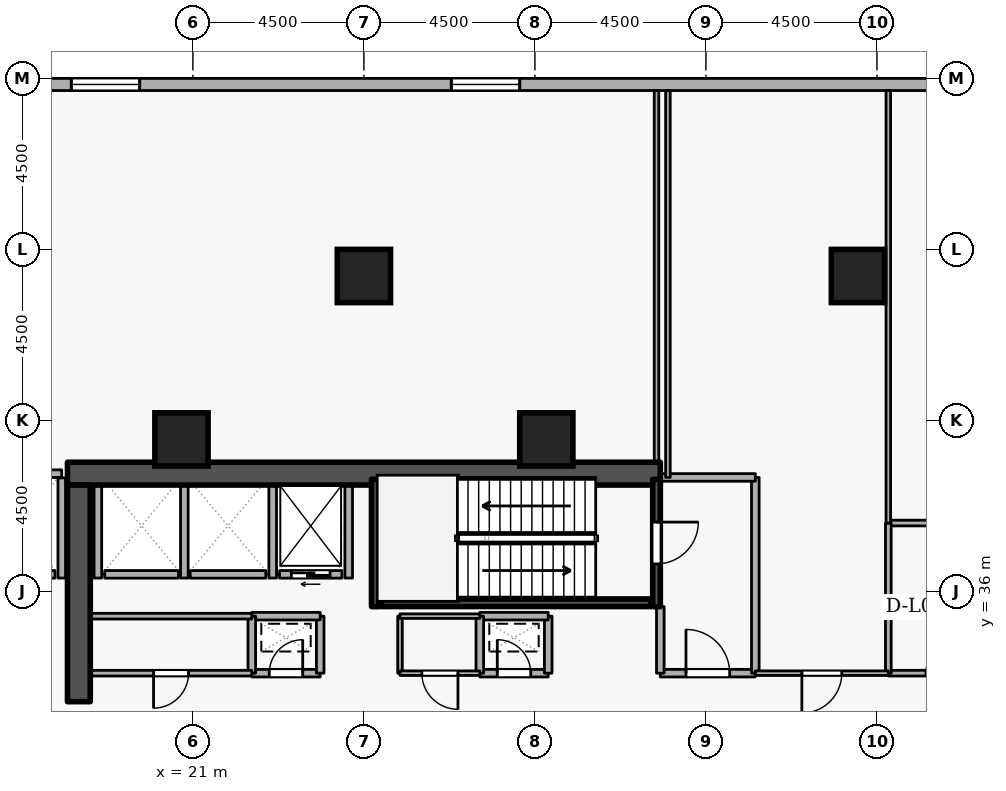
"""IFC4 building model, lengths in metres.
Left out: names, types, materials, properties, quantities, classifications, styles, units other than length and angle.
Written with IfcOpenShell. Run it as: python <this file> out.ifc"""

import sys

from ifc_helpers import new_model, si_unit, direction, frame, frame_2d, origin, origin_2d, place, context, subcontext, project, spatial, rectangle, extrude, element, fill, save


model = new_model("IFC4")
c1 = context("Model", 3, precision=1e-05, world=origin(), true_north=direction((0.0, 1.0)))
c2 = subcontext(c1, "Body", "Model", "MODEL_VIEW")
j1 = project(units=[si_unit("LENGTHUNIT", "METRE"), si_unit("PLANEANGLEUNIT", "RADIAN")], contexts=[c1])
p1 = place(None, origin())
s1 = spatial("IfcSite", under=j1, at=p1, CompositionType="ELEMENT")
p2 = place(p1, origin())
s2 = spatial("IfcBuilding", under=s1, at=p2, CompositionType="ELEMENT")
p3 = place(p2, frame((0.0, 0.0, 14.1)))
s3 = spatial("IfcBuildingStorey", under=s2, at=p3, CompositionType="ELEMENT", Elevation=14.1)
p4 = place(p3, frame((17.7, 39.1, 0.0), z_axis=(0.0, 0.0, 1.0), x_axis=(1.0, 0.0, 0.0)))
e1 = element("IfcWall", 1, at=p4, inside=s3, PredefinedType="SHEAR", context=c2, shape_type="SweptSolid", body=[
    extrude(rectangle(XDim=15.6, YDim=0.6, at=frame_2d((7.8, 0.0))), origin(), (0.0, 0.0, 1.0), 4.5),
])
p5 = place(p3, frame((18.0, 33.1, 0.0), z_axis=(0.0, 0.0, 1.0), x_axis=(0.0, 1.0, 0.0)))
e2 = element("IfcWall", 2, at=p5, inside=s3, PredefinedType="SHEAR", context=c2, shape_type="SweptSolid", body=[
    extrude(rectangle(XDim=5.7, YDim=0.6, at=frame_2d((2.85, 0.0))), origin(), (0.0, 0.0, 1.0), 4.5),
])
for number, where, z_axis, x_axis in (
    (3, (25.5, 44.3, 0.0), (0.0, 0.0, 1.0), (1.0, 0.0, 0.0)),
    (4, (38.5, 44.3, 0.0), (0.0, 0.0, 1.0), (1.0, 0.0, 0.0)),
    (5, (20.7, 40.0, 0.0), (0.0, 0.0, 1.0), (1.0, 0.0, 0.0)),
    (6, (30.3, 40.0, 0.0), (0.0, 0.0, 1.0), (1.0, 0.0, 0.0)),
):
    element("IfcColumn", number, at=place(p3, frame(where, z_axis=z_axis, x_axis=x_axis)), inside=s3, PredefinedType="COLUMN", context=c2, shape_type="SweptSolid", body=[
        extrude(rectangle(XDim=1.4, YDim=1.4, at=origin_2d()), origin(), (0.0, 0.0, 1.0), 4.5),
    ])
p6 = place(p3, frame((42.4, 49.34, 0.0), z_axis=(0.0, 0.0, 1.0), x_axis=(-1.0, 0.0, 0.0)))
e7 = element("IfcWall", 7, at=p6, inside=s3, PredefinedType="STANDARD", context=c2, shape_type="SweptSolid", body=[
    extrude(rectangle(XDim=39.4, YDim=0.32, at=frame_2d((19.7, 0.0))), origin(), (0.0, 0.0, 1.0), 3.56),
])
p7 = place(p6, frame((12.8, 0.0, 0.78)))
e8 = element("IfcOpeningElement", 8, at=p7, cuts=e7, PredefinedType="OPENING", context=c2, shape_type="SweptSolid", body=[
    extrude(rectangle(XDim=1.8, YDim=2.15, at=frame_2d((0.9, 1.075))), frame((0.0, 0.17, 0.0), z_axis=(0.0, -1.0, 0.0), x_axis=(1.0, 0.0, 0.0)), (0.0, 0.0, 1.0), 0.34),
])
p8 = place(p6, frame((22.8, 0.0, 0.78)))
e9 = element("IfcOpeningElement", 9, at=p8, cuts=e7, PredefinedType="OPENING", context=c2, shape_type="SweptSolid", body=[
    extrude(rectangle(XDim=1.8, YDim=2.15, at=frame_2d((0.9, 1.075))), frame((0.0, 0.17, 0.0), z_axis=(0.0, -1.0, 0.0), x_axis=(1.0, 0.0, 0.0)), (0.0, 0.0, 1.0), 0.34),
])
p9 = place(p3, frame((24.92, 36.45, 0.0), z_axis=(0.0, 0.0, 1.0), x_axis=(-1.0, 0.0, 0.0)))
e10 = element("IfcWall", 10, at=p9, inside=s3, PredefinedType="STANDARD", context=c2, shape_type="SweptSolid", body=[
    extrude(rectangle(XDim=1.64, YDim=0.2, at=frame_2d((0.82, 0.0))), origin(), (0.0, 0.0, 1.0), 4.16),
])
p10 = place(p9, frame((0.31, 0.0, 0.0)))
e11 = element("IfcOpeningElement", 11, at=p10, cuts=e10, PredefinedType="OPENING", context=c2, shape_type="SweptSolid", body=[
    extrude(rectangle(XDim=1.02, YDim=2.06, at=frame_2d((0.51, 1.03))), frame((0.0, 0.11, 0.0), z_axis=(0.0, -1.0, 0.0), x_axis=(1.0, 0.0, 0.0)), (0.0, 0.0, 1.0), 0.22),
])
p11 = place(p3, frame((22.92, 36.45, 0.0), z_axis=(0.0, 0.0, 1.0), x_axis=(-1.0, 0.0, 0.0)))
e12 = element("IfcWall", 12, at=p11, inside=s3, PredefinedType="STANDARD", context=c2, shape_type="SweptSolid", body=[
    extrude(rectangle(XDim=1.99, YDim=0.2, at=frame_2d((0.995, 0.0))), origin(), (0.0, 0.0, 1.0), 4.16),
])
p12 = place(p3, frame((20.62, 36.45, 0.0), z_axis=(0.0, 0.0, 1.0), x_axis=(-1.0, 0.0, 0.0)))
e13 = element("IfcWall", 13, at=p12, inside=s3, PredefinedType="STANDARD", context=c2, shape_type="SweptSolid", body=[
    extrude(rectangle(XDim=1.94, YDim=0.2, at=frame_2d((0.97, 0.0))), origin(), (0.0, 0.0, 1.0), 4.16),
])
p13 = place(p3, frame((17.37, 36.45, 0.0), z_axis=(0.0, 0.0, 1.0), x_axis=(-1.0, 0.0, 0.0)))
e14 = element("IfcWall", 14, at=p13, inside=s3, PredefinedType="STANDARD", context=c2, shape_type="SweptSolid", body=[
    extrude(rectangle(XDim=1.74, YDim=0.2, at=frame_2d((0.87, 0.0))), origin(), (0.0, 0.0, 1.0), 4.16),
])
for number, where, z_axis, x_axis in (
    (15, (25.1, 36.352, 0.0), (0.0, 0.0, 1.0), (0.0, 1.0, 0.0)),
    (16, (23.1, 36.352, 0.0), (0.0, 0.0, 1.0), (0.0, 1.0, 0.0)),
    (17, (20.775, 36.352, 0.0), (0.0, 0.0, 1.0), (0.0, 1.0, 0.0)),
    (18, (18.5, 36.352, 0.0), (0.0, 0.0, 1.0), (0.0, 1.0, 0.0)),
):
    element("IfcWall", number, at=place(p3, frame(where, z_axis=z_axis, x_axis=x_axis)), inside=s3, PredefinedType="STANDARD", context=c2, shape_type="SweptSolid", body=[
        extrude(rectangle(XDim=2.436, YDim=0.2, at=frame_2d((1.218, 0.0))), origin(), (0.0, 0.0, 1.0), 4.16),
    ])
p14 = place(p3, frame((13.352, 39.1, 0.0), z_axis=(0.0, 0.0, 1.0), x_axis=(1.0, 0.0, 0.0)))
e19 = element("IfcWall", 19, at=p14, inside=s3, PredefinedType="STANDARD", context=c2, shape_type="SweptSolid", body=[
    extrude(rectangle(XDim=4.196, YDim=0.2, at=frame_2d((2.098, 0.0))), origin(), (0.0, 0.0, 1.0), 4.16),
])
p15 = place(p3, frame((17.55, 36.352, 0.0), z_axis=(0.0, 0.0, 1.0), x_axis=(0.0, 1.0, 0.0)))
e20 = element("IfcWall", 20, at=p15, inside=s3, PredefinedType="STANDARD", context=c2, shape_type="SweptSolid", body=[
    extrude(rectangle(XDim=2.636, YDim=0.2, at=frame_2d((1.318, 0.0))), origin(), (0.0, 0.0, 1.0), 3.365),
])
p16 = place(p3, frame((33.2, 38.95, 0.0), z_axis=(0.0, 0.0, 1.0), x_axis=(0.0, -1.0, 0.0)))
e21 = element("IfcWall", 21, at=p16, inside=s3, PredefinedType="SHEAR", context=c2, shape_type="SweptSolid", body=[
    extrude(rectangle(XDim=3.35, YDim=0.2, at=frame_2d((1.675, 0.0))), origin(), (0.0, 0.0, 1.0), 4.5),
])
p17 = place(p16, frame((1.125, 0.0, 0.0)))
e22 = element("IfcOpeningElement", 22, at=p17, cuts=e21, PredefinedType="OPENING", context=c2, shape_type="SweptSolid", body=[
    extrude(rectangle(XDim=1.1, YDim=2.1, at=frame_2d((0.55, 1.05))), frame((0.0, 0.11, 0.0), z_axis=(0.0, -1.0, 0.0), x_axis=(1.0, 0.0, 0.0)), (0.0, 0.0, 1.0), 0.22),
])
p18 = place(p3, frame((25.8, 35.6, 0.0), z_axis=(0.0, 0.0, 1.0), x_axis=(0.0, 1.0, 0.0)))
e23 = element("IfcWall", 23, at=p18, inside=s3, PredefinedType="SHEAR", context=c2, shape_type="SweptSolid", body=[
    extrude(rectangle(XDim=3.35, YDim=0.2, at=frame_2d((1.675, 0.0))), origin(), (0.0, 0.0, 1.0), 4.5),
])
p19 = place(p3, frame((25.95, 35.703, 0.0), z_axis=(0.0, 0.0, 1.0), x_axis=(1.0, 0.0, 0.0)))
e24 = element("IfcWall", 24, at=p19, inside=s3, PredefinedType="SHEAR", context=c2, shape_type="SweptSolid", body=[
    extrude(rectangle(XDim=7.1, YDim=0.2, at=frame_2d((3.55, 0.0))), origin(), (0.0, 0.0, 1.0), 4.5),
])
p20 = place(p3, frame((33.3, 33.85, 0.0), z_axis=(0.0, 0.0, 1.0), x_axis=(1.0, 0.0, 0.0)))
e25 = element("IfcWall", 25, at=p20, inside=s3, PredefinedType="STANDARD", context=c2, shape_type="SweptSolid", body=[
    extrude(rectangle(XDim=2.5, YDim=0.2, at=frame_2d((1.25, 0.0))), origin(), (0.0, 0.0, 1.0), 4.16),
])
p21 = place(p20, frame((0.675, 0.0, 0.0)))
e26 = element("IfcOpeningElement", 26, at=p21, cuts=e25, PredefinedType="OPENING", context=c2, shape_type="SweptSolid", body=[
    extrude(rectangle(XDim=1.15, YDim=2.1, at=frame_2d((0.575, 1.05))), frame((0.0, 0.11, 0.0), z_axis=(0.0, -1.0, 0.0), x_axis=(1.0, 0.0, 0.0)), (0.0, 0.0, 1.0), 0.22),
])
p22 = place(p3, frame((35.8, 33.85, 0.0), z_axis=(0.0, 0.0, 1.0), x_axis=(0.0, 1.0, 0.0)))
e27 = element("IfcWall", 27, at=p22, inside=s3, PredefinedType="STANDARD", context=c2, shape_type="SweptSolid", body=[
    extrude(rectangle(XDim=5.15, YDim=0.2, at=frame_2d((2.575, 0.0))), origin(), (0.0, 0.0, 1.0), 4.16),
])
p23 = place(p3, frame((35.8, 39.0, 0.0), z_axis=(0.0, 0.0, 1.0), x_axis=(-1.0, 0.0, 0.0)))
e28 = element("IfcWall", 28, at=p23, inside=s3, PredefinedType="STANDARD", context=c2, shape_type="SweptSolid", body=[
    extrude(rectangle(XDim=2.5, YDim=0.2, at=frame_2d((1.25, 0.0))), origin(), (0.0, 0.0, 1.0), 4.16),
])
p24 = place(p3, frame((33.3, 35.6, 0.0), z_axis=(0.0, 0.0, 1.0), x_axis=(0.0, -1.0, 0.0)))
e29 = element("IfcWall", 29, at=p24, inside=s3, PredefinedType="STANDARD", context=c2, shape_type="SweptSolid", body=[
    extrude(rectangle(XDim=1.75, YDim=0.2, at=frame_2d((0.875, 0.0))), origin(), (0.0, 0.0, 1.0), 3.365),
])
p25 = place(p3, frame((22.55, 33.85, 0.0), z_axis=(0.0, 0.0, 1.0), x_axis=(1.0, 0.0, 0.0)))
e30 = element("IfcWall", 30, at=p25, inside=s3, PredefinedType="STANDARD", context=c2, shape_type="SweptSolid", body=[
    extrude(rectangle(XDim=1.8, YDim=0.2, at=frame_2d((0.9, 0.0))), origin(), (0.0, 0.0, 1.0), 4.16),
])
p26 = place(p25, frame((0.46, 0.0, 0.0)))
e31 = element("IfcOpeningElement", 31, at=p26, cuts=e30, PredefinedType="OPENING", context=c2, shape_type="SweptSolid", body=[
    extrude(rectangle(XDim=0.88, YDim=2.04, at=frame_2d((0.44, 1.02))), frame((0.0, 0.11, 0.0), z_axis=(0.0, -1.0, 0.0), x_axis=(1.0, 0.0, 0.0)), (0.0, 0.0, 1.0), 0.22),
])
p27 = place(p3, frame((24.35, 33.85, 0.0), z_axis=(0.0, 0.0, 1.0), x_axis=(0.0, 1.0, 0.0)))
e32 = element("IfcWall", 32, at=p27, inside=s3, PredefinedType="STANDARD", context=c2, shape_type="SweptSolid", body=[
    extrude(rectangle(XDim=1.5, YDim=0.2, at=frame_2d((0.75, 0.0))), origin(), (0.0, 0.0, 1.0), 4.16),
])
p28 = place(p3, frame((24.35, 35.35, 0.0), z_axis=(0.0, 0.0, 1.0), x_axis=(-1.0, 0.0, 0.0)))
e33 = element("IfcWall", 33, at=p28, inside=s3, PredefinedType="STANDARD", context=c2, shape_type="SweptSolid", body=[
    extrude(rectangle(XDim=1.8, YDim=0.2, at=frame_2d((0.9, 0.0))), origin(), (0.0, 0.0, 1.0), 4.16),
])
p29 = place(p3, frame((22.55, 35.35, 0.0), z_axis=(0.0, 0.0, 1.0), x_axis=(0.0, -1.0, 0.0)))
e34 = element("IfcWall", 34, at=p29, inside=s3, PredefinedType="STANDARD", context=c2, shape_type="SweptSolid", body=[
    extrude(rectangle(XDim=1.5, YDim=0.2, at=frame_2d((0.75, 0.0))), origin(), (0.0, 0.0, 1.0), 4.16),
])
p30 = place(p3, frame((28.55, 33.85, 0.0), z_axis=(0.0, 0.0, 1.0), x_axis=(1.0, 0.0, 0.0)))
e35 = element("IfcWall", 35, at=p30, inside=s3, PredefinedType="STANDARD", context=c2, shape_type="SweptSolid", body=[
    extrude(rectangle(XDim=1.8, YDim=0.2, at=frame_2d((0.9, 0.0))), origin(), (0.0, 0.0, 1.0), 4.16),
])
p31 = place(p30, frame((0.46, 0.0, 0.0)))
e36 = element("IfcOpeningElement", 36, at=p31, cuts=e35, PredefinedType="OPENING", context=c2, shape_type="SweptSolid", body=[
    extrude(rectangle(XDim=0.88, YDim=2.04, at=frame_2d((0.44, 1.02))), frame((0.0, 0.11, 0.0), z_axis=(0.0, -1.0, 0.0), x_axis=(1.0, 0.0, 0.0)), (0.0, 0.0, 1.0), 0.22),
])
p32 = place(p3, frame((30.35, 33.85, 0.0), z_axis=(0.0, 0.0, 1.0), x_axis=(0.0, 1.0, 0.0)))
e37 = element("IfcWall", 37, at=p32, inside=s3, PredefinedType="STANDARD", context=c2, shape_type="SweptSolid", body=[
    extrude(rectangle(XDim=1.5, YDim=0.2, at=frame_2d((0.75, 0.0))), origin(), (0.0, 0.0, 1.0), 4.16),
])
p33 = place(p3, frame((30.35, 35.35, 0.0), z_axis=(0.0, 0.0, 1.0), x_axis=(-1.0, 0.0, 0.0)))
e38 = element("IfcWall", 38, at=p33, inside=s3, PredefinedType="STANDARD", context=c2, shape_type="SweptSolid", body=[
    extrude(rectangle(XDim=1.8, YDim=0.2, at=frame_2d((0.9, 0.0))), origin(), (0.0, 0.0, 1.0), 4.16),
])
p34 = place(p3, frame((28.55, 35.35, 0.0), z_axis=(0.0, 0.0, 1.0), x_axis=(0.0, -1.0, 0.0)))
e39 = element("IfcWall", 39, at=p34, inside=s3, PredefinedType="STANDARD", context=c2, shape_type="SweptSolid", body=[
    extrude(rectangle(XDim=1.5, YDim=0.2, at=frame_2d((0.75, 0.0))), origin(), (0.0, 0.0, 1.0), 4.16),
])
p35 = place(p3, frame((18.3, 35.35, 0.0), z_axis=(0.0, 0.0, 1.0), x_axis=(1.0, 0.0, 0.0)))
e40 = element("IfcWall", 40, at=p35, inside=s3, PredefinedType="PARTITIONING", context=c2, shape_type="SweptSolid", body=[
    extrude(rectangle(XDim=4.25, YDim=0.15, at=frame_2d((2.125, 0.0))), origin(), (0.0, 0.0, 1.0), 4.16),
])
p36 = place(p3, frame((22.55, 33.85, 0.0), z_axis=(0.0, 0.0, 1.0), x_axis=(-1.0, 0.0, 0.0)))
e41 = element("IfcWall", 41, at=p36, inside=s3, PredefinedType="PARTITIONING", context=c2, shape_type="SweptSolid", body=[
    extrude(rectangle(XDim=4.25, YDim=0.15, at=frame_2d((2.125, 0.0))), origin(), (0.0, 0.0, 1.0), 4.16),
])
p37 = place(p36, frame((1.665, 0.0, 0.0)))
e42 = element("IfcOpeningElement", 42, at=p37, cuts=e41, PredefinedType="OPENING", context=c2, shape_type="SweptSolid", body=[
    extrude(rectangle(XDim=0.92, YDim=2.08, at=frame_2d((0.46, 1.04))), frame((0.0, 0.085, 0.0), z_axis=(0.0, -1.0, 0.0), x_axis=(1.0, 0.0, 0.0)), (0.0, 0.0, 1.0), 0.17),
])
p38 = place(p3, frame((26.45, 33.85, 0.0), z_axis=(0.0, 0.0, 1.0), x_axis=(0.0, 1.0, 0.0)))
e43 = element("IfcWall", 43, at=p38, inside=s3, PredefinedType="PARTITIONING", context=c2, shape_type="SweptSolid", body=[
    extrude(rectangle(XDim=1.5, YDim=0.12, at=frame_2d((0.75, 0.0))), origin(), (0.0, 0.0, 1.0), 4.16),
])
p39 = place(p3, frame((26.45, 35.35, 0.0), z_axis=(0.0, 0.0, 1.0), x_axis=(1.0, 0.0, 0.0)))
e44 = element("IfcWall", 44, at=p39, inside=s3, PredefinedType="PARTITIONING", context=c2, shape_type="SweptSolid", body=[
    extrude(rectangle(XDim=2.1, YDim=0.12, at=frame_2d((1.05, 0.0))), origin(), (0.0, 0.0, 1.0), 4.16),
])
p40 = place(p3, frame((28.55, 33.85, 0.0), z_axis=(0.0, 0.0, 1.0), x_axis=(-1.0, 0.0, 0.0)))
e45 = element("IfcWall", 45, at=p40, inside=s3, PredefinedType="PARTITIONING", context=c2, shape_type="SweptSolid", body=[
    extrude(rectangle(XDim=2.1, YDim=0.12, at=frame_2d((1.05, 0.0))), origin(), (0.0, 0.0, 1.0), 4.16),
])
p41 = place(p40, frame((0.575, 0.0, 0.0)))
e46 = element("IfcOpeningElement", 46, at=p41, cuts=e45, PredefinedType="OPENING", context=c2, shape_type="SweptSolid", body=[
    extrude(rectangle(XDim=0.95, YDim=2.1, at=frame_2d((0.475, 1.05))), frame((0.0, 0.07, 0.0), z_axis=(0.0, -1.0, 0.0), x_axis=(1.0, 0.0, 0.0)), (0.0, 0.0, 1.0), 0.14),
])
p42 = place(p3, frame((39.3, 33.85, 0.0), z_axis=(0.0, 0.0, 1.0), x_axis=(1.0, 0.0, 0.0)))
e47 = element("IfcWall", 47, at=p42, inside=s3, PredefinedType="PARTITIONING", context=c2, shape_type="SweptSolid", body=[
    extrude(rectangle(XDim=2.9, YDim=0.15, at=frame_2d((1.45, 0.0))), origin(), (0.0, 0.0, 1.0), 4.16),
])
p43 = place(p42, frame((0.99, 0.0, 0.0)))
e48 = element("IfcOpeningElement", 48, at=p43, cuts=e47, PredefinedType="OPENING", context=c2, shape_type="SweptSolid", body=[
    extrude(rectangle(XDim=0.92, YDim=2.08, at=frame_2d((0.46, 1.04))), frame((0.0, 0.085, 0.0), z_axis=(0.0, -1.0, 0.0), x_axis=(1.0, 0.0, 0.0)), (0.0, 0.0, 1.0), 0.17),
])
p44 = place(p3, frame((42.2, 37.8, 0.0), z_axis=(0.0, 0.0, 1.0), x_axis=(-1.0, 0.0, 0.0)))
e49 = element("IfcWall", 49, at=p44, inside=s3, PredefinedType="PARTITIONING", context=c2, shape_type="SweptSolid", body=[
    extrude(rectangle(XDim=2.9, YDim=0.15, at=frame_2d((1.45, 0.0))), origin(), (0.0, 0.0, 1.0), 4.16),
])
p45 = place(p3, frame((39.3, 37.8, 0.0), z_axis=(0.0, 0.0, 1.0), x_axis=(0.0, -1.0, 0.0)))
e50 = element("IfcWall", 50, at=p45, inside=s3, PredefinedType="PARTITIONING", context=c2, shape_type="SweptSolid", body=[
    extrude(rectangle(XDim=3.95, YDim=0.15, at=frame_2d((1.975, 0.0))), origin(), (0.0, 0.0, 1.0), 4.16),
])
p46 = place(p3, frame((33.5, 39.0, 0.0), z_axis=(0.0, 0.0, 1.0), x_axis=(0.0, 1.0, 0.0)))
e51 = element("IfcWall", 51, at=p46, inside=s3, PredefinedType="PARTITIONING", context=c2, shape_type="SweptSolid", body=[
    extrude(rectangle(XDim=10.18, YDim=0.12, at=frame_2d((5.09, 0.0))), origin(), (0.0, 0.0, 1.0), 4.16),
])
p47 = place(p3, frame((39.3, 49.18, 0.0), z_axis=(0.0, 0.0, 1.0), x_axis=(0.0, -1.0, 0.0)))
e52 = element("IfcWall", 52, at=p47, inside=s3, PredefinedType="PARTITIONING", context=c2, shape_type="SweptSolid", body=[
    extrude(rectangle(XDim=11.38, YDim=0.12, at=frame_2d((5.69, 0.0))), origin(), (0.0, 0.0, 1.0), 4.16),
])
p48 = place(p3, frame((39.3, 33.85, 0.0), z_axis=(0.0, 0.0, 1.0), x_axis=(-1.0, 0.0, 0.0)))
e53 = element("IfcWall", 53, at=p48, inside=s3, PredefinedType="PARTITIONING", context=c2, shape_type="SweptSolid", body=[
    extrude(rectangle(XDim=3.5, YDim=0.12, at=frame_2d((1.75, 0.0))), origin(), (0.0, 0.0, 1.0), 4.16),
])
p49 = place(p48, frame((1.225, 0.0, 0.0)))
e54 = element("IfcOpeningElement", 54, at=p49, cuts=e53, PredefinedType="OPENING", context=c2, shape_type="SweptSolid", body=[
    extrude(rectangle(XDim=1.05, YDim=2.1, at=frame_2d((0.525, 1.05))), frame((0.0, 0.07, 0.0), z_axis=(0.0, -1.0, 0.0), x_axis=(1.0, 0.0, 0.0)), (0.0, 0.0, 1.0), 0.14),
])
p50 = place(p3, frame((33.2, 49.18, 0.0), z_axis=(0.0, 0.0, 1.0), x_axis=(0.0, -1.0, 0.0)))
e55 = element("IfcWall", 55, at=p50, inside=s3, PredefinedType="PARTITIONING", context=c2, shape_type="SweptSolid", body=[
    extrude(rectangle(XDim=9.98, YDim=0.12, at=frame_2d((4.99, 0.0))), origin(), (0.0, 0.0, 1.0), 4.16),
])
p51 = place(p7, origin())
e56 = element("IfcWindow", 56, at=p51, inside=s3, PartitioningType="SINGLE_PANEL", PredefinedType="WINDOW", context=c2, shape_type="SweptSolid", body=[
    extrude(rectangle(XDim=1.8, YDim=2.15, at=frame_2d((0.9, 1.075))), frame((0.0, 0.03, 0.0), z_axis=(0.0, -1.0, 0.0), x_axis=(1.0, 0.0, 0.0)), (0.0, 0.0, 1.0), 0.06),
])
fill(e8, e56)
p52 = place(p8, origin())
e57 = element("IfcWindow", 57, at=p52, inside=s3, PartitioningType="SINGLE_PANEL", PredefinedType="WINDOW", context=c2, shape_type="SweptSolid", body=[
    extrude(rectangle(XDim=1.8, YDim=2.15, at=frame_2d((0.9, 1.075))), frame((0.0, 0.03, 0.0), z_axis=(0.0, -1.0, 0.0), x_axis=(1.0, 0.0, 0.0)), (0.0, 0.0, 1.0), 0.06),
])
fill(e9, e57)
p53 = place(p10, origin())
e58 = element("IfcDoor", 58, at=p53, inside=s3, OperationType="SLIDING_TO_LEFT", PredefinedType="DOOR", context=c2, shape_type="SweptSolid", body=[
    extrude(rectangle(XDim=1.02, YDim=2.06, at=frame_2d((0.51, 1.03))), frame((0.0, 0.025, 0.0), z_axis=(0.0, -1.0, 0.0), x_axis=(1.0, 0.0, 0.0)), (0.0, 0.0, 1.0), 0.05),
])
fill(e11, e58)
p54 = place(p17, origin())
e59 = element("IfcDoor", 59, at=p54, inside=s3, OperationType="SINGLE_SWING_LEFT", PredefinedType="DOOR", context=c2, shape_type="SweptSolid", body=[
    extrude(rectangle(XDim=1.1, YDim=2.1, at=frame_2d((0.55, 1.05))), frame((0.0, 0.025, 0.0), z_axis=(0.0, -1.0, 0.0), x_axis=(1.0, 0.0, 0.0)), (0.0, 0.0, 1.0), 0.05),
])
fill(e22, e59)
p55 = place(p21, origin())
e60 = element("IfcDoor", 60, at=p55, inside=s3, OperationType="SINGLE_SWING_LEFT", PredefinedType="DOOR", context=c2, shape_type="SweptSolid", body=[
    extrude(rectangle(XDim=1.15, YDim=2.1, at=frame_2d((0.575, 1.05))), frame((0.0, 0.025, 0.0), z_axis=(0.0, -1.0, 0.0), x_axis=(1.0, 0.0, 0.0)), (0.0, 0.0, 1.0), 0.05),
])
fill(e26, e60)
p56 = place(p26, origin())
e61 = element("IfcDoor", 61, at=p56, inside=s3, OperationType="SINGLE_SWING_RIGHT", PredefinedType="DOOR", context=c2, shape_type="SweptSolid", body=[
    extrude(rectangle(XDim=0.88, YDim=2.04, at=frame_2d((0.44, 1.02))), frame((0.0, 0.025, 0.0), z_axis=(0.0, -1.0, 0.0), x_axis=(1.0, 0.0, 0.0)), (0.0, 0.0, 1.0), 0.05),
])
fill(e31, e61)
p57 = place(p31, origin())
e62 = element("IfcDoor", 62, at=p57, inside=s3, OperationType="SINGLE_SWING_LEFT", PredefinedType="DOOR", context=c2, shape_type="SweptSolid", body=[
    extrude(rectangle(XDim=0.88, YDim=2.04, at=frame_2d((0.44, 1.02))), frame((0.0, 0.025, 0.0), z_axis=(0.0, -1.0, 0.0), x_axis=(1.0, 0.0, 0.0)), (0.0, 0.0, 1.0), 0.05),
])
fill(e36, e62)
p58 = place(p37, origin())
e63 = element("IfcDoor", 63, at=p58, inside=s3, OperationType="SINGLE_SWING_RIGHT", PredefinedType="DOOR", context=c2, shape_type="SweptSolid", body=[
    extrude(rectangle(XDim=0.92, YDim=2.08, at=frame_2d((0.46, 1.04))), frame((0.0, 0.025, 0.0), z_axis=(0.0, -1.0, 0.0), x_axis=(1.0, 0.0, 0.0)), (0.0, 0.0, 1.0), 0.05),
])
fill(e42, e63)
p59 = place(p41, origin())
e64 = element("IfcDoor", 64, at=p59, inside=s3, OperationType="SINGLE_SWING_LEFT", PredefinedType="DOOR", context=c2, shape_type="SweptSolid", body=[
    extrude(rectangle(XDim=0.95, YDim=2.1, at=frame_2d((0.475, 1.05))), frame((0.0, 0.025, 0.0), z_axis=(0.0, -1.0, 0.0), x_axis=(1.0, 0.0, 0.0)), (0.0, 0.0, 1.0), 0.05),
])
fill(e46, e64)
p60 = place(p43, origin())
e65 = element("IfcDoor", 65, at=p60, inside=s3, OperationType="SINGLE_SWING_RIGHT", PredefinedType="DOOR", context=c2, shape_type="SweptSolid", body=[
    extrude(rectangle(XDim=0.92, YDim=2.08, at=frame_2d((0.46, 1.04))), frame((0.0, 0.025, 0.0), z_axis=(0.0, -1.0, 0.0), x_axis=(1.0, 0.0, 0.0)), (0.0, 0.0, 1.0), 0.05),
])
fill(e48, e65)
p61 = place(p49, origin())
e66 = element("IfcDoor", 66, at=p61, inside=s3, OperationType="SINGLE_SWING_RIGHT", PredefinedType="DOOR", context=c2, shape_type="SweptSolid", body=[
    extrude(rectangle(XDim=1.05, YDim=2.1, at=frame_2d((0.525, 1.05))), frame((0.0, 0.025, 0.0), z_axis=(0.0, -1.0, 0.0), x_axis=(1.0, 0.0, 0.0)), (0.0, 0.0, 1.0), 0.05),
])
fill(e54, e66)
save(model, sys.argv[1])
